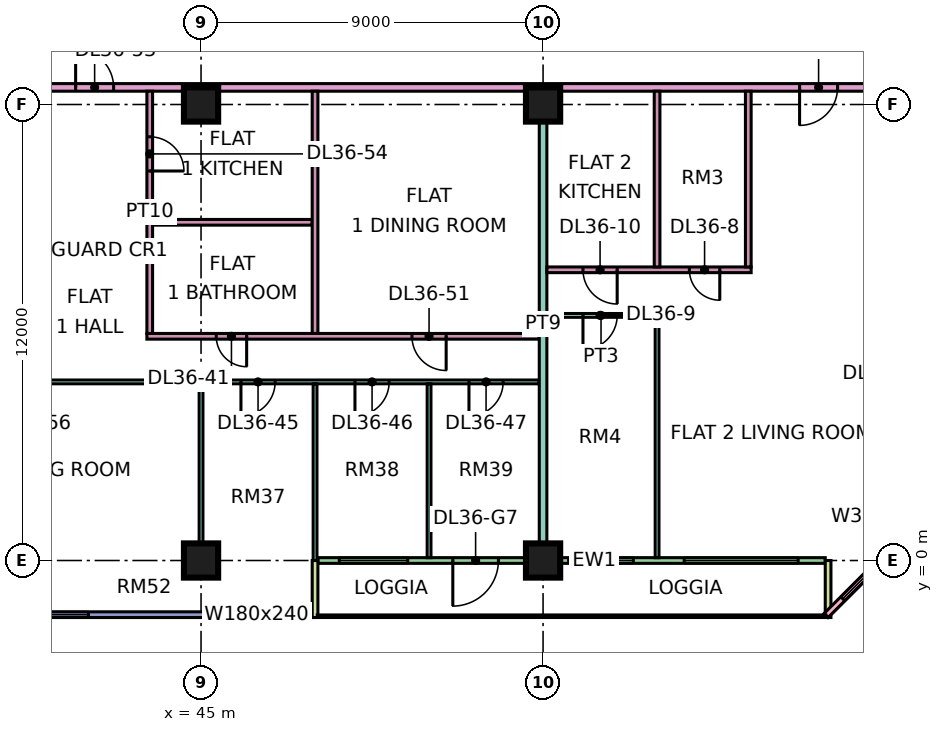
"""IFC4 building model, lengths in metres.
Left out: names, types, materials, properties, quantities, classifications, styles, units other than length and angle.
Written with IfcOpenShell. Run it as: python <this file> out.ifc"""

import sys

from ifc_helpers import new_model, si_unit, direction, frame, frame_2d, origin, origin_2d, place, context, subcontext, project, spatial, rectangle, extrude, element, fill, save


model = new_model("IFC4")
c1 = context("Model", 3, precision=1e-05, world=origin(), true_north=direction((0.0, 1.0)))
c2 = subcontext(c1, "Body", "Model", "MODEL_VIEW")
j1 = project(units=[si_unit("LENGTHUNIT", "METRE"), si_unit("PLANEANGLEUNIT", "RADIAN")], contexts=[c1])
p1 = place(None, origin())
s1 = spatial("IfcSite", under=j1, at=p1, CompositionType="ELEMENT")
p2 = place(p1, origin())
s2 = spatial("IfcBuilding", under=s1, at=p2, CompositionType="ELEMENT")
p3 = place(p2, frame((0.0, 0.0, 161.15)))
s3 = spatial("IfcBuildingStorey", under=s2, at=p3, CompositionType="ELEMENT", Elevation=161.15)
for number, where, z_axis, x_axis in (
    (1, (45.0, 0.0, 0.0), (0.0, 0.0, 1.0), (1.0, 0.0, 0.0)),
    (2, (45.0, 12.0, 0.0), (0.0, 0.0, 1.0), (1.0, 0.0, 0.0)),
    (3, (54.0, 0.0, 0.0), (0.0, 0.0, 1.0), (1.0, 0.0, 0.0)),
    (4, (54.0, 12.0, 0.0), (0.0, 0.0, 1.0), (1.0, 0.0, 0.0)),
):
    element("IfcColumn", number, at=place(p3, frame(where, z_axis=z_axis, x_axis=x_axis)), inside=s3, PredefinedType="COLUMN", context=c2, shape_type="SweptSolid", body=[
        extrude(rectangle(XDim=0.9, YDim=0.9, at=origin_2d()), origin(), (0.0, 0.0, 1.0), 3.75),
    ])
p4 = place(p3, frame((36.075, -1.425, 0.0), z_axis=(0.0, 0.0, 1.0), x_axis=(1.0, 0.0, 0.0)))
e5 = element("IfcWall", 5, at=p4, inside=s3, PredefinedType="SOLIDWALL", context=c2, shape_type="SweptSolid", body=[
    extrude(rectangle(XDim=11.85, YDim=0.15, at=frame_2d((5.925, 0.0))), origin(), (0.0, 0.0, 1.0), 3.35),
])
p5 = place(p4, frame((2.962, 0.0, 0.45)))
e6 = element("IfcOpeningElement", 6, at=p5, cuts=e5, PredefinedType="OPENING", context=c2, shape_type="SweptSolid", body=[
    extrude(rectangle(XDim=3.0, YDim=2.4, at=frame_2d((1.5, 1.2))), frame((0.0, 0.085, 0.0), z_axis=(0.0, -1.0, 0.0), x_axis=(1.0, 0.0, 0.0)), (0.0, 0.0, 1.0), 0.17),
])
p6 = place(p4, frame((9.488, 0.0, 0.45)))
e7 = element("IfcOpeningElement", 7, at=p6, cuts=e5, PredefinedType="OPENING", context=c2, shape_type="SweptSolid", body=[
    extrude(rectangle(XDim=1.8, YDim=2.4, at=frame_2d((0.9, 1.2))), frame((0.0, 0.085, 0.0), z_axis=(0.0, -1.0, 0.0), x_axis=(1.0, 0.0, 0.0)), (0.0, 0.0, 1.0), 0.17),
])
p7 = place(p3, frame((48.075, 0.0, 0.0), z_axis=(0.0, 0.0, 1.0), x_axis=(1.0, 0.0, 0.0)))
e8 = element("IfcWall", 8, at=p7, inside=s3, PredefinedType="SOLIDWALL", context=c2, shape_type="SweptSolid", body=[
    extrude(rectangle(XDim=13.35, YDim=0.15, at=frame_2d((6.675, 0.0))), origin(), (0.0, 0.0, 1.0), 3.35),
])
p8 = place(p7, frame((0.562, 0.0, 0.45)))
e9 = element("IfcOpeningElement", 9, at=p8, cuts=e8, PredefinedType="OPENING", context=c2, shape_type="SweptSolid", body=[
    extrude(rectangle(XDim=1.8, YDim=2.4, at=frame_2d((0.9, 1.2))), frame((0.0, 0.085, 0.0), z_axis=(0.0, -1.0, 0.0), x_axis=(1.0, 0.0, 0.0)), (0.0, 0.0, 1.0), 0.17),
])
p9 = place(p7, frame((3.55, 0.0, 0.0)))
e10 = element("IfcOpeningElement", 10, at=p9, cuts=e8, PredefinedType="OPENING", context=c2, shape_type="SweptSolid", body=[
    extrude(rectangle(XDim=1.2, YDim=2.4, at=frame_2d((0.6, 1.2))), frame((0.0, 0.085, 0.0), z_axis=(0.0, -1.0, 0.0), x_axis=(1.0, 0.0, 0.0)), (0.0, 0.0, 1.0), 0.17),
])
p10 = place(p7, frame((7.1, 0.0, 0.45)))
e11 = element("IfcOpeningElement", 11, at=p10, cuts=e8, PredefinedType="OPENING", context=c2, shape_type="SweptSolid", body=[
    extrude(rectangle(XDim=1.2, YDim=2.4, at=frame_2d((0.6, 1.2))), frame((0.0, 0.085, 0.0), z_axis=(0.0, -1.0, 0.0), x_axis=(1.0, 0.0, 0.0)), (0.0, 0.0, 1.0), 0.17),
])
p11 = place(p7, frame((9.637, 0.0, 0.45)))
e12 = element("IfcOpeningElement", 12, at=p11, cuts=e8, PredefinedType="OPENING", context=c2, shape_type="SweptSolid", body=[
    extrude(rectangle(XDim=3.0, YDim=2.4, at=frame_2d((1.5, 1.2))), frame((0.0, 0.085, 0.0), z_axis=(0.0, -1.0, 0.0), x_axis=(1.0, 0.0, 0.0)), (0.0, 0.0, 1.0), 0.17),
])
for number, where, z_axis, x_axis in (
    (13, (48.0, -1.5, 0.0), (0.0, 0.0, 1.0), (0.0, 1.0, 0.0)),
    (14, (61.5, -1.5, 0.0), (0.0, 0.0, 1.0), (0.0, 1.0, 0.0)),
):
    element("IfcWall", number, at=place(p3, frame(where, z_axis=z_axis, x_axis=x_axis)), inside=s3, PredefinedType="SOLIDWALL", context=c2, shape_type="SweptSolid", body=[
        extrude(rectangle(XDim=1.5, YDim=0.15, at=frame_2d((0.75, 0.0))), origin(), (0.0, 0.0, 1.0), 3.35),
    ])
p12 = place(p3, frame((61.447, -1.447, 0.0), z_axis=(0.0, 0.0, 1.0), x_axis=(0.707106781187, 0.707106781187, 0.0)))
e15 = element("IfcWall", 15, at=p12, inside=s3, PredefinedType="SOLIDWALL", context=c2, shape_type="SweptSolid", body=[
    extrude(rectangle(XDim=4.243, YDim=0.15, at=frame_2d((2.121, 0.0))), origin(), (0.0, 0.0, 1.0), 3.35),
])
p13 = place(p12, frame((0.621, 0.0, 0.45)))
e16 = element("IfcOpeningElement", 16, at=p13, cuts=e15, PredefinedType="OPENING", context=c2, shape_type="SweptSolid", body=[
    extrude(rectangle(XDim=3.0, YDim=2.4, at=frame_2d((1.5, 1.2))), frame((0.0, 0.085, 0.0), z_axis=(0.0, -1.0, 0.0), x_axis=(1.0, 0.0, 0.0)), (0.0, 0.0, 1.0), 0.17),
])
p14 = place(p3, frame((33.05, 4.7, 0.0), z_axis=(0.0, 0.0, 1.0), x_axis=(1.0, 0.0, 0.0)))
e17 = element("IfcWall", 17, at=p14, inside=s3, PredefinedType="PARTITIONING", context=c2, shape_type="SweptSolid", body=[
    extrude(rectangle(XDim=20.85, YDim=0.1, at=frame_2d((10.425, 0.0))), origin(), (0.0, 0.0, 1.0), 3.35),
])
p15 = place(p14, frame((1.0, 0.0, 0.0)))
e18 = element("IfcOpeningElement", 18, at=p15, cuts=e17, PredefinedType="OPENING", context=c2, shape_type="SweptSolid", body=[
    extrude(rectangle(XDim=0.9, YDim=2.1, at=frame_2d((0.45, 1.05))), frame((0.0, 0.06, 0.0), z_axis=(0.0, -1.0, 0.0), x_axis=(1.0, 0.0, 0.0)), (0.0, 0.0, 1.0), 0.12),
])
p16 = place(p14, frame((13.0, 0.0, 0.0)))
e19 = element("IfcOpeningElement", 19, at=p16, cuts=e17, PredefinedType="OPENING", context=c2, shape_type="SweptSolid", body=[
    extrude(rectangle(XDim=0.9, YDim=2.1, at=frame_2d((0.45, 1.05))), frame((0.0, 0.06, 0.0), z_axis=(0.0, -1.0, 0.0), x_axis=(1.0, 0.0, 0.0)), (0.0, 0.0, 1.0), 0.12),
])
p17 = place(p14, frame((16.0, 0.0, 0.0)))
e20 = element("IfcOpeningElement", 20, at=p17, cuts=e17, PredefinedType="OPENING", context=c2, shape_type="SweptSolid", body=[
    extrude(rectangle(XDim=0.9, YDim=2.1, at=frame_2d((0.45, 1.05))), frame((0.0, 0.06, 0.0), z_axis=(0.0, -1.0, 0.0), x_axis=(1.0, 0.0, 0.0)), (0.0, 0.0, 1.0), 0.12),
])
p18 = place(p14, frame((19.0, 0.0, 0.0)))
e21 = element("IfcOpeningElement", 21, at=p18, cuts=e17, PredefinedType="OPENING", context=c2, shape_type="SweptSolid", body=[
    extrude(rectangle(XDim=0.9, YDim=2.1, at=frame_2d((0.45, 1.05))), frame((0.0, 0.06, 0.0), z_axis=(0.0, -1.0, 0.0), x_axis=(1.0, 0.0, 0.0)), (0.0, 0.0, 1.0), 0.12),
])
p19 = place(p14, frame((7.0, 0.0, 0.0)))
e22 = element("IfcOpeningElement", 22, at=p19, cuts=e17, PredefinedType="OPENING", context=c2, shape_type="SweptSolid", body=[
    extrude(rectangle(XDim=0.9, YDim=2.1, at=frame_2d((0.45, 1.05))), frame((0.0, 0.06, 0.0), z_axis=(0.0, -1.0, 0.0), x_axis=(1.0, 0.0, 0.0)), (0.0, 0.0, 1.0), 0.12),
])
p20 = place(p3, frame((40.65, 12.45, 0.0), z_axis=(0.0, 0.0, 1.0), x_axis=(1.0, 0.0, 0.0)))
e23 = element("IfcWall", 23, at=p20, inside=s3, PredefinedType="PARTITIONING", context=c2, shape_type="SweptSolid", body=[
    extrude(rectangle(XDim=22.35, YDim=0.2, at=frame_2d((11.175, 0.0))), origin(), (0.0, 0.0, 1.0), 3.35),
])
p21 = place(p20, frame((20.1, 0.0, 0.0)))
e24 = element("IfcOpeningElement", 24, at=p21, cuts=e23, PredefinedType="OPENING", context=c2, shape_type="SweptSolid", body=[
    extrude(rectangle(XDim=1.0, YDim=2.1, at=frame_2d((0.5, 1.05))), frame((0.0, 0.11, 0.0), z_axis=(0.0, -1.0, 0.0), x_axis=(1.0, 0.0, 0.0)), (0.0, 0.0, 1.0), 0.22),
])
p22 = place(p20, frame((1.05, 0.0, 0.0)))
e25 = element("IfcOpeningElement", 25, at=p22, cuts=e23, PredefinedType="OPENING", context=c2, shape_type="SweptSolid", body=[
    extrude(rectangle(XDim=1.0, YDim=2.1, at=frame_2d((0.5, 1.05))), frame((0.0, 0.11, 0.0), z_axis=(0.0, -1.0, 0.0), x_axis=(1.0, 0.0, 0.0)), (0.0, 0.0, 1.0), 0.22),
])
p23 = place(p3, frame((43.575, 5.9, 0.0), z_axis=(0.0, 0.0, 1.0), x_axis=(1.0, 0.0, 0.0)))
e26 = element("IfcWall", 26, at=p23, inside=s3, PredefinedType="PARTITIONING", context=c2, shape_type="SweptSolid", body=[
    extrude(rectangle(XDim=10.325, YDim=0.15, at=frame_2d((5.163, 0.0))), origin(), (0.0, 0.0, 1.0), 3.35),
])
p24 = place(p23, frame((1.825, 0.0, 0.0)))
e27 = element("IfcOpeningElement", 27, at=p24, cuts=e26, PredefinedType="OPENING", context=c2, shape_type="SweptSolid", body=[
    extrude(rectangle(XDim=0.8, YDim=2.1, at=frame_2d((0.4, 1.05))), frame((0.0, 0.085, 0.0), z_axis=(0.0, -1.0, 0.0), x_axis=(1.0, 0.0, 0.0)), (0.0, 0.0, 1.0), 0.17),
])
p25 = place(p23, frame((6.975, 0.0, 0.0)))
e28 = element("IfcOpeningElement", 28, at=p25, cuts=e26, PredefinedType="OPENING", context=c2, shape_type="SweptSolid", body=[
    extrude(rectangle(XDim=0.9, YDim=2.1, at=frame_2d((0.45, 1.05))), frame((0.0, 0.085, 0.0), z_axis=(0.0, -1.0, 0.0), x_axis=(1.0, 0.0, 0.0)), (0.0, 0.0, 1.0), 0.17),
])
p26 = place(p3, frame((43.65, 5.975, 0.0), z_axis=(0.0, 0.0, 1.0), x_axis=(0.0, 1.0, 0.0)))
e29 = element("IfcWall", 29, at=p26, inside=s3, PredefinedType="PARTITIONING", context=c2, shape_type="SweptSolid", body=[
    extrude(rectangle(XDim=6.375, YDim=0.15, at=frame_2d((3.188, 0.0))), origin(), (0.0, 0.0, 1.0), 3.35),
])
p27 = place(p26, frame((4.275, 0.0, 0.0)))
e30 = element("IfcOpeningElement", 30, at=p27, cuts=e29, PredefinedType="OPENING", context=c2, shape_type="SweptSolid", body=[
    extrude(rectangle(XDim=0.9, YDim=2.1, at=frame_2d((0.45, 1.05))), frame((0.0, 0.085, 0.0), z_axis=(0.0, -1.0, 0.0), x_axis=(1.0, 0.0, 0.0)), (0.0, 0.0, 1.0), 0.17),
])
p28 = place(p3, frame((43.725, 8.9, 0.0), z_axis=(0.0, 0.0, 1.0), x_axis=(1.0, 0.0, 0.0)))
e31 = element("IfcWall", 31, at=p28, inside=s3, PredefinedType="PARTITIONING", context=c2, shape_type="SweptSolid", body=[
    extrude(rectangle(XDim=4.2, YDim=0.15, at=frame_2d((2.1, 0.0))), origin(), (0.0, 0.0, 1.0), 3.35),
])
for number, where, z_axis, x_axis in (
    (32, (45.0, 0.0, 0.0), (0.0, 0.0, 1.0), (0.0, 1.0, 0.0)),
    (33, (48.0, 0.0, 0.0), (0.0, 0.0, 1.0), (0.0, 1.0, 0.0)),
):
    element("IfcWall", number, at=place(p3, frame(where, z_axis=z_axis, x_axis=x_axis)), inside=s3, PredefinedType="PARTITIONING", context=c2, shape_type="SweptSolid", body=[
        extrude(rectangle(XDim=4.65, YDim=0.1, at=frame_2d((2.325, 0.0))), origin(), (0.0, 0.0, 1.0), 3.35),
    ])
p29 = place(p3, frame((48.0, 5.975, 0.0), z_axis=(0.0, 0.0, 1.0), x_axis=(0.0, 1.0, 0.0)))
e34 = element("IfcWall", 34, at=p29, inside=s3, PredefinedType="PARTITIONING", context=c2, shape_type="SweptSolid", body=[
    extrude(rectangle(XDim=6.375, YDim=0.15, at=frame_2d((3.188, 0.0))), origin(), (0.0, 0.0, 1.0), 3.35),
])
p30 = place(p3, frame((51.0, 0.074, 0.0), z_axis=(0.0, 0.0, 1.0), x_axis=(0.0, 1.0, 0.0)))
e35 = element("IfcWall", 35, at=p30, inside=s3, PredefinedType="PARTITIONING", context=c2, shape_type="SweptSolid", body=[
    extrude(rectangle(XDim=4.576, YDim=0.1, at=frame_2d((2.288, 0.0))), origin(), (0.0, 0.0, 1.0), 3.35),
])
p31 = place(p3, frame((54.0, 0.074, 0.0), z_axis=(0.0, 0.0, 1.0), x_axis=(0.0, 1.0, 0.0)))
e36 = element("IfcWall", 36, at=p31, inside=s3, PredefinedType="PARTITIONING", context=c2, shape_type="SweptSolid", body=[
    extrude(rectangle(XDim=12.276, YDim=0.2, at=frame_2d((6.138, 0.0))), origin(), (0.0, 0.0, 1.0), 3.35),
])
p32 = place(p3, frame((54.1, 6.45, 0.0), z_axis=(0.0, 0.0, 1.0), x_axis=(1.0, 0.0, 0.0)))
e37 = element("IfcWall", 37, at=p32, inside=s3, PredefinedType="PARTITIONING", context=c2, shape_type="SweptSolid", body=[
    extrude(rectangle(XDim=2.85, YDim=0.1, at=frame_2d((1.425, 0.0))), origin(), (0.0, 0.0, 1.0), 3.35),
])
p33 = place(p32, frame((0.95, 0.0, 0.0)))
e38 = element("IfcOpeningElement", 38, at=p33, cuts=e37, PredefinedType="OPENING", context=c2, shape_type="SweptSolid", body=[
    extrude(rectangle(XDim=0.9, YDim=2.1, at=frame_2d((0.45, 1.05))), frame((0.0, 0.06, 0.0), z_axis=(0.0, -1.0, 0.0), x_axis=(1.0, 0.0, 0.0)), (0.0, 0.0, 1.0), 0.12),
])
p34 = place(p3, frame((54.1, 7.65, 0.0), z_axis=(0.0, 0.0, 1.0), x_axis=(1.0, 0.0, 0.0)))
e39 = element("IfcWall", 39, at=p34, inside=s3, PredefinedType="PARTITIONING", context=c2, shape_type="SweptSolid", body=[
    extrude(rectangle(XDim=5.375, YDim=0.15, at=frame_2d((2.688, 0.0))), origin(), (0.0, 0.0, 1.0), 3.35),
])
p35 = place(p34, frame((3.75, 0.0, 0.0)))
e40 = element("IfcOpeningElement", 40, at=p35, cuts=e39, PredefinedType="OPENING", context=c2, shape_type="SweptSolid", body=[
    extrude(rectangle(XDim=0.8, YDim=2.1, at=frame_2d((0.4, 1.05))), frame((0.0, 0.085, 0.0), z_axis=(0.0, -1.0, 0.0), x_axis=(1.0, 0.0, 0.0)), (0.0, 0.0, 1.0), 0.17),
])
p36 = place(p34, frame((0.95, 0.0, 0.0)))
e41 = element("IfcOpeningElement", 41, at=p36, cuts=e39, PredefinedType="OPENING", context=c2, shape_type="SweptSolid", body=[
    extrude(rectangle(XDim=0.9, YDim=2.1, at=frame_2d((0.45, 1.05))), frame((0.0, 0.085, 0.0), z_axis=(0.0, -1.0, 0.0), x_axis=(1.0, 0.0, 0.0)), (0.0, 0.0, 1.0), 0.17),
])
p37 = place(p3, frame((57.0, 0.074, 0.0), z_axis=(0.0, 0.0, 1.0), x_axis=(0.0, 1.0, 0.0)))
e42 = element("IfcWall", 42, at=p37, inside=s3, PredefinedType="PARTITIONING", context=c2, shape_type="SweptSolid", body=[
    extrude(rectangle(XDim=6.426, YDim=0.1, at=frame_2d((3.213, 0.0))), origin(), (0.0, 0.0, 1.0), 3.35),
])
for number, where, z_axis, x_axis in (
    (43, (57.0, 7.725, 0.0), (0.0, 0.0, 1.0), (0.0, 1.0, 0.0)),
    (44, (59.4, 7.725, 0.0), (0.0, 0.0, 1.0), (0.0, 1.0, 0.0)),
):
    element("IfcWall", number, at=place(p3, frame(where, z_axis=z_axis, x_axis=x_axis)), inside=s3, PredefinedType="PARTITIONING", context=c2, shape_type="SweptSolid", body=[
        extrude(rectangle(XDim=4.625, YDim=0.15, at=frame_2d((2.312, 0.0))), origin(), (0.0, 0.0, 1.0), 3.35),
    ])
p38 = place(p5, origin())
e45 = element("IfcWindow", 45, at=p38, inside=s3, PartitioningType="SINGLE_PANEL", PredefinedType="WINDOW", context=c2, shape_type="SweptSolid", body=[
    extrude(rectangle(XDim=3.0, YDim=2.4, at=frame_2d((1.5, 1.2))), frame((0.0, 0.03, 0.0), z_axis=(0.0, -1.0, 0.0), x_axis=(1.0, 0.0, 0.0)), (0.0, 0.0, 1.0), 0.06),
])
fill(e6, e45)
p39 = place(p6, origin())
e46 = element("IfcWindow", 46, at=p39, inside=s3, PartitioningType="SINGLE_PANEL", PredefinedType="WINDOW", context=c2, shape_type="SweptSolid", body=[
    extrude(rectangle(XDim=1.8, YDim=2.4, at=frame_2d((0.9, 1.2))), frame((0.0, 0.03, 0.0), z_axis=(0.0, -1.0, 0.0), x_axis=(1.0, 0.0, 0.0)), (0.0, 0.0, 1.0), 0.06),
])
fill(e7, e46)
p40 = place(p8, origin())
e47 = element("IfcWindow", 47, at=p40, inside=s3, PartitioningType="SINGLE_PANEL", PredefinedType="WINDOW", context=c2, shape_type="SweptSolid", body=[
    extrude(rectangle(XDim=1.8, YDim=2.4, at=frame_2d((0.9, 1.2))), frame((0.0, 0.03, 0.0), z_axis=(0.0, -1.0, 0.0), x_axis=(1.0, 0.0, 0.0)), (0.0, 0.0, 1.0), 0.06),
])
fill(e9, e47)
p41 = place(p9, frame((1.2, 0.0, 0.0), z_axis=(0.0, 0.0, 1.0), x_axis=(-1.0, 0.0, 0.0)))
e48 = element("IfcDoor", 48, at=p41, inside=s3, OperationType="DOUBLE_DOOR_SINGLE_SWING", PredefinedType="DOOR", context=c2, shape_type="SweptSolid", body=[
    extrude(rectangle(XDim=1.2, YDim=2.4, at=frame_2d((0.6, 1.2))), frame((0.0, 0.025, 0.0), z_axis=(0.0, -1.0, 0.0), x_axis=(1.0, 0.0, 0.0)), (0.0, 0.0, 1.0), 0.05),
])
fill(e10, e48)
p42 = place(p10, origin())
e49 = element("IfcWindow", 49, at=p42, inside=s3, PartitioningType="SINGLE_PANEL", PredefinedType="WINDOW", context=c2, shape_type="SweptSolid", body=[
    extrude(rectangle(XDim=1.2, YDim=2.4, at=frame_2d((0.6, 1.2))), frame((0.0, 0.03, 0.0), z_axis=(0.0, -1.0, 0.0), x_axis=(1.0, 0.0, 0.0)), (0.0, 0.0, 1.0), 0.06),
])
fill(e11, e49)
p43 = place(p11, origin())
e50 = element("IfcWindow", 50, at=p43, inside=s3, PartitioningType="SINGLE_PANEL", PredefinedType="WINDOW", context=c2, shape_type="SweptSolid", body=[
    extrude(rectangle(XDim=3.0, YDim=2.4, at=frame_2d((1.5, 1.2))), frame((0.0, 0.03, 0.0), z_axis=(0.0, -1.0, 0.0), x_axis=(1.0, 0.0, 0.0)), (0.0, 0.0, 1.0), 0.06),
])
fill(e12, e50)
p44 = place(p13, origin())
e51 = element("IfcWindow", 51, at=p44, inside=s3, PartitioningType="SINGLE_PANEL", PredefinedType="WINDOW", context=c2, shape_type="SweptSolid", body=[
    extrude(rectangle(XDim=3.0, YDim=2.4, at=frame_2d((1.5, 1.2))), frame((0.0, 0.03, 0.0), z_axis=(0.0, -1.0, 0.0), x_axis=(1.0, 0.0, 0.0)), (0.0, 0.0, 1.0), 0.06),
])
fill(e16, e51)
p45 = place(p35, origin())
e52 = element("IfcDoor", 52, at=p45, inside=s3, OperationType="SINGLE_SWING_RIGHT", PredefinedType="DOOR", context=c2, shape_type="SweptSolid", body=[
    extrude(rectangle(XDim=0.8, YDim=2.1, at=frame_2d((0.4, 1.05))), frame((0.0, 0.025, 0.0), z_axis=(0.0, -1.0, 0.0), x_axis=(1.0, 0.0, 0.0)), (0.0, 0.0, 1.0), 0.05),
])
fill(e40, e52)
p46 = place(p33, frame((0.9, 0.0, 0.0), z_axis=(0.0, 0.0, 1.0), x_axis=(-1.0, 0.0, 0.0)))
e53 = element("IfcDoor", 53, at=p46, inside=s3, OperationType="SINGLE_SWING_LEFT", PredefinedType="DOOR", context=c2, shape_type="SweptSolid", body=[
    extrude(rectangle(XDim=0.9, YDim=2.1, at=frame_2d((0.45, 1.05))), frame((0.0, 0.025, 0.0), z_axis=(0.0, -1.0, 0.0), x_axis=(1.0, 0.0, 0.0)), (0.0, 0.0, 1.0), 0.05),
])
fill(e38, e53)
p47 = place(p36, origin())
e54 = element("IfcDoor", 54, at=p47, inside=s3, OperationType="SINGLE_SWING_RIGHT", PredefinedType="DOOR", context=c2, shape_type="SweptSolid", body=[
    extrude(rectangle(XDim=0.9, YDim=2.1, at=frame_2d((0.45, 1.05))), frame((0.0, 0.025, 0.0), z_axis=(0.0, -1.0, 0.0), x_axis=(1.0, 0.0, 0.0)), (0.0, 0.0, 1.0), 0.05),
])
fill(e41, e54)
p48 = place(p21, frame((1.0, 0.0, 0.0), z_axis=(0.0, 0.0, 1.0), x_axis=(-1.0, 0.0, 0.0)))
e55 = element("IfcDoor", 55, at=p48, inside=s3, OperationType="SINGLE_SWING_LEFT", PredefinedType="DOOR", context=c2, shape_type="SweptSolid", body=[
    extrude(rectangle(XDim=1.0, YDim=2.1, at=frame_2d((0.5, 1.05))), frame((0.0, 0.025, 0.0), z_axis=(0.0, -1.0, 0.0), x_axis=(1.0, 0.0, 0.0)), (0.0, 0.0, 1.0), 0.05),
])
fill(e24, e55)
p49 = place(p24, origin())
e56 = element("IfcDoor", 56, at=p49, inside=s3, OperationType="SINGLE_SWING_RIGHT", PredefinedType="DOOR", context=c2, shape_type="SweptSolid", body=[
    extrude(rectangle(XDim=0.8, YDim=2.1, at=frame_2d((0.4, 1.05))), frame((0.0, 0.025, 0.0), z_axis=(0.0, -1.0, 0.0), x_axis=(1.0, 0.0, 0.0)), (0.0, 0.0, 1.0), 0.05),
])
fill(e27, e56)
p50 = place(p16, frame((0.9, 0.0, 0.0), z_axis=(0.0, 0.0, 1.0), x_axis=(-1.0, 0.0, 0.0)))
e57 = element("IfcDoor", 57, at=p50, inside=s3, OperationType="SINGLE_SWING_LEFT", PredefinedType="DOOR", context=c2, shape_type="SweptSolid", body=[
    extrude(rectangle(XDim=0.9, YDim=2.1, at=frame_2d((0.45, 1.05))), frame((0.0, 0.025, 0.0), z_axis=(0.0, -1.0, 0.0), x_axis=(1.0, 0.0, 0.0)), (0.0, 0.0, 1.0), 0.05),
])
fill(e19, e57)
p51 = place(p17, frame((0.9, 0.0, 0.0), z_axis=(0.0, 0.0, 1.0), x_axis=(-1.0, 0.0, 0.0)))
e58 = element("IfcDoor", 58, at=p51, inside=s3, OperationType="SINGLE_SWING_LEFT", PredefinedType="DOOR", context=c2, shape_type="SweptSolid", body=[
    extrude(rectangle(XDim=0.9, YDim=2.1, at=frame_2d((0.45, 1.05))), frame((0.0, 0.025, 0.0), z_axis=(0.0, -1.0, 0.0), x_axis=(1.0, 0.0, 0.0)), (0.0, 0.0, 1.0), 0.05),
])
fill(e20, e58)
p52 = place(p18, frame((0.9, 0.0, 0.0), z_axis=(0.0, 0.0, 1.0), x_axis=(-1.0, 0.0, 0.0)))
e59 = element("IfcDoor", 59, at=p52, inside=s3, OperationType="SINGLE_SWING_LEFT", PredefinedType="DOOR", context=c2, shape_type="SweptSolid", body=[
    extrude(rectangle(XDim=0.9, YDim=2.1, at=frame_2d((0.45, 1.05))), frame((0.0, 0.025, 0.0), z_axis=(0.0, -1.0, 0.0), x_axis=(1.0, 0.0, 0.0)), (0.0, 0.0, 1.0), 0.05),
])
fill(e21, e59)
p53 = place(p25, origin())
e60 = element("IfcDoor", 60, at=p53, inside=s3, OperationType="SINGLE_SWING_RIGHT", PredefinedType="DOOR", context=c2, shape_type="SweptSolid", body=[
    extrude(rectangle(XDim=0.9, YDim=2.1, at=frame_2d((0.45, 1.05))), frame((0.0, 0.025, 0.0), z_axis=(0.0, -1.0, 0.0), x_axis=(1.0, 0.0, 0.0)), (0.0, 0.0, 1.0), 0.05),
])
fill(e28, e60)
p54 = place(p22, origin())
e61 = element("IfcDoor", 61, at=p54, inside=s3, OperationType="SINGLE_SWING_LEFT", PredefinedType="DOOR", context=c2, shape_type="SweptSolid", body=[
    extrude(rectangle(XDim=1.0, YDim=2.1, at=frame_2d((0.5, 1.05))), frame((0.0, 0.025, 0.0), z_axis=(0.0, -1.0, 0.0), x_axis=(1.0, 0.0, 0.0)), (0.0, 0.0, 1.0), 0.05),
])
fill(e25, e61)
p55 = place(p27, frame((0.9, 0.0, 0.0), z_axis=(0.0, 0.0, 1.0), x_axis=(-1.0, 0.0, 0.0)))
e62 = element("IfcDoor", 62, at=p55, inside=s3, OperationType="SINGLE_SWING_LEFT", PredefinedType="DOOR", context=c2, shape_type="SweptSolid", body=[
    extrude(rectangle(XDim=0.9, YDim=2.1, at=frame_2d((0.45, 1.05))), frame((0.0, 0.025, 0.0), z_axis=(0.0, -1.0, 0.0), x_axis=(1.0, 0.0, 0.0)), (0.0, 0.0, 1.0), 0.05),
])
fill(e30, e62)
save(model, sys.argv[1])
